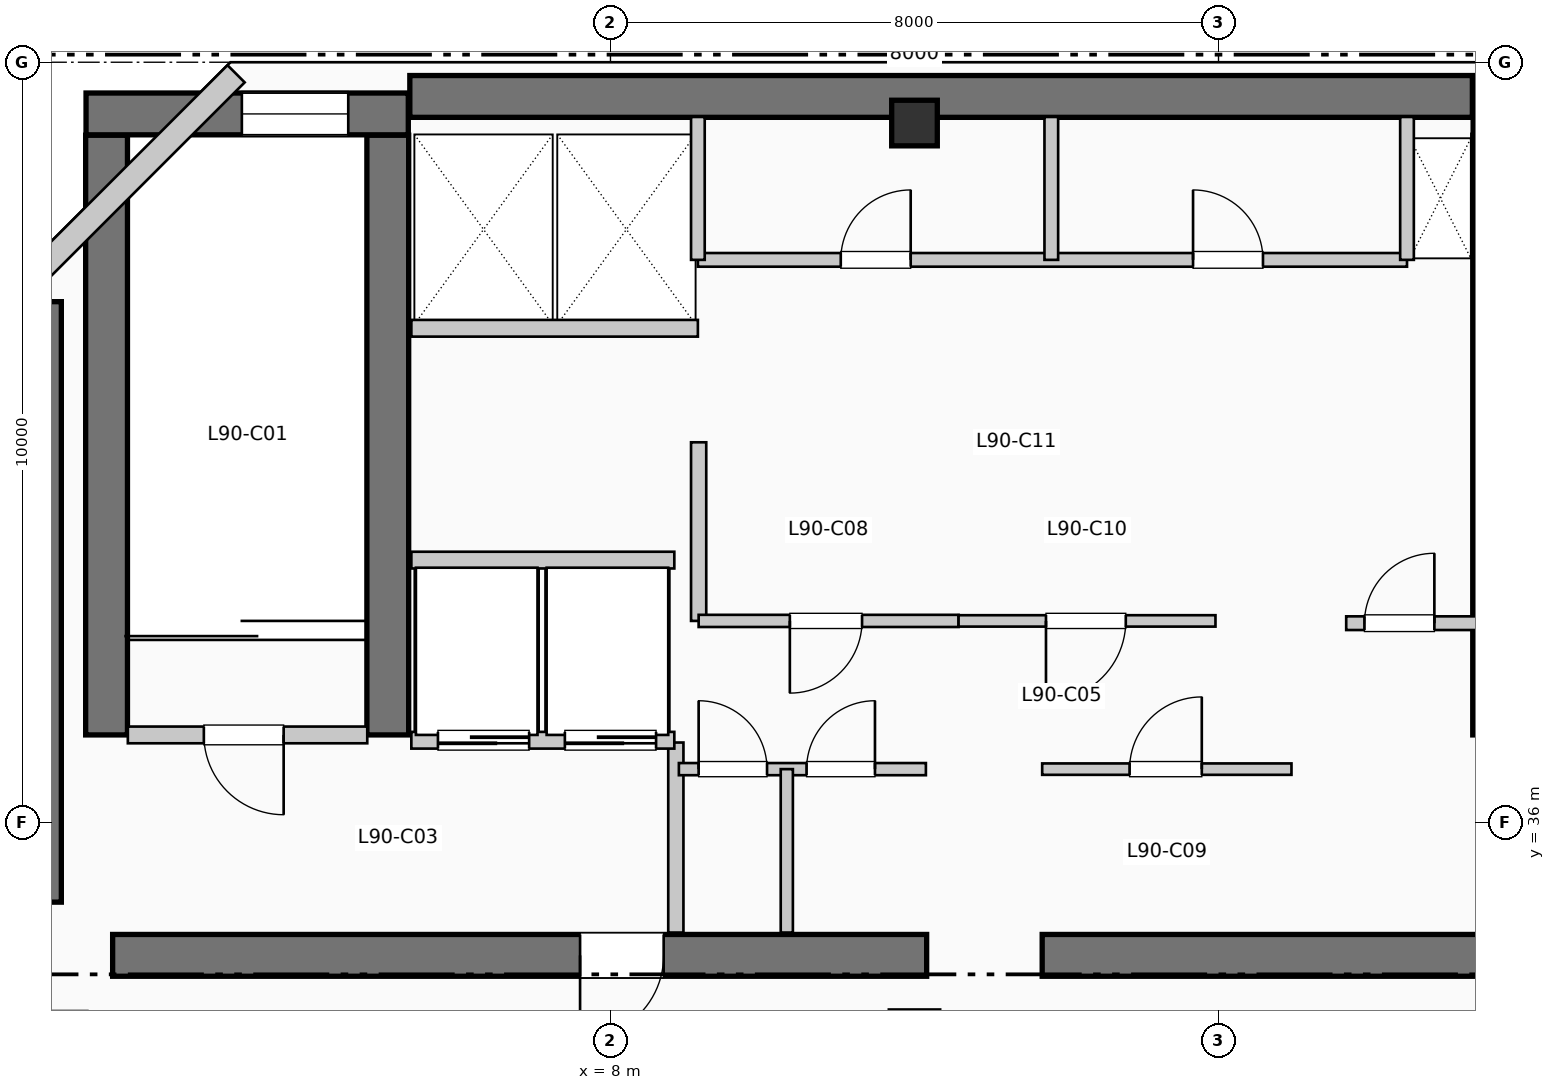
"""IFC4 building model, lengths in metres.
Left out: names, types, materials, properties, quantities, classifications, styles, units other than length and angle.
Written with IfcOpenShell. Run it as: python <this file> out.ifc"""

import sys

from ifc_helpers import new_model, si_unit, direction, frame, frame_2d, origin, origin_2d, place, context, subcontext, project, spatial, rectangle, extrude, element, fill, save


model = new_model("IFC4")
c1 = context("Model", 3, precision=1e-05, world=origin(), true_north=direction((0.0, 1.0)))
c2 = subcontext(c1, "Body", "Model", "MODEL_VIEW")
j1 = project(units=[si_unit("LENGTHUNIT", "METRE"), si_unit("PLANEANGLEUNIT", "RADIAN")], contexts=[c1])
p1 = place(None, origin())
s1 = spatial("IfcSite", under=j1, at=p1, CompositionType="ELEMENT")
p2 = place(p1, origin())
s2 = spatial("IfcBuilding", under=s1, at=p2, CompositionType="ELEMENT")
p3 = place(p2, frame((0.0, 0.0, 369.93)))
s3 = spatial("IfcBuildingStorey", under=s2, at=p3, CompositionType="ELEMENT", Elevation=369.93)
p4 = place(p3, frame((5.36, 45.55, 0.0), z_axis=(0.0, 0.0, 1.0), x_axis=(1.0, 0.0, 0.0)))
e1 = element("IfcWall", 1, at=p4, inside=s3, PredefinedType="SHEAR", context=c2, shape_type="SweptSolid", body=[
    extrude(rectangle(XDim=13.98, YDim=0.55, at=frame_2d((6.99, 0.0))), origin(), (0.0, 0.0, 1.0), 3.96),
])
p5 = place(p3, frame((0.5, 34.95, 0.0), z_axis=(0.0, 0.0, 1.0), x_axis=(0.0, 1.0, 0.0)))
e2 = element("IfcWall", 2, at=p5, inside=s3, PredefinedType="SHEAR", context=c2, shape_type="SweptSolid", body=[
    extrude(rectangle(XDim=7.9, YDim=0.55, at=frame_2d((3.95, 0.0))), origin(), (0.0, 0.0, 1.0), 3.96),
])
p6 = place(p3, frame((1.45, 34.25, 0.0), z_axis=(0.0, 0.0, 1.0), x_axis=(1.0, 0.0, 0.0)))
e3 = element("IfcWall", 3, at=p6, inside=s3, PredefinedType="SHEAR", context=c2, shape_type="SweptSolid", body=[
    extrude(rectangle(XDim=10.71, YDim=0.55, at=frame_2d((5.355, 0.0))), origin(), (0.0, 0.0, 1.0), 3.96),
])
p7 = place(p6, frame((7.25, 0.0, 0.0), z_axis=(0.0, 0.0, 1.0), x_axis=(-1.0, 0.0, 0.0)))
e4 = element("IfcOpeningElement", 4, at=p7, cuts=e3, PredefinedType="OPENING", context=c2, shape_type="SweptSolid", body=[
    extrude(rectangle(XDim=1.1, YDim=2.15, at=frame_2d((0.55, 1.075))), frame((0.0, 0.285, 0.0), z_axis=(0.0, -1.0, 0.0), x_axis=(1.0, 0.0, 0.0)), (0.0, 0.0, 1.0), 0.57),
])
p8 = place(p3, frame((13.68, 34.25, 0.0), z_axis=(0.0, 0.0, 1.0), x_axis=(1.0, 0.0, 0.0)))
e5 = element("IfcWall", 5, at=p8, inside=s3, PredefinedType="SHEAR", context=c2, shape_type="SweptSolid", body=[
    extrude(rectangle(XDim=6.12, YDim=0.55, at=frame_2d((3.06, 0.0))), origin(), (0.0, 0.0, 1.0), 3.96),
])
for number, where, z_axis, x_axis in (
    (6, (1.37, 37.15, 0.0), (0.0, 0.0, 1.0), (0.0, 1.0, 0.0)),
    (7, (5.07, 37.15, 0.0), (0.0, 0.0, 1.0), (0.0, 1.0, 0.0)),
):
    element("IfcWall", number, at=place(p3, frame(where, z_axis=z_axis, x_axis=x_axis)), inside=s3, PredefinedType="SHEAR", context=c2, shape_type="SweptSolid", body=[
        extrude(rectangle(XDim=7.89, YDim=0.55, at=frame_2d((3.945, 0.0))), origin(), (0.0, 0.0, 1.0), 3.96),
    ])
p9 = place(p3, frame((1.1, 45.32, 0.0), z_axis=(0.0, 0.0, 1.0), x_axis=(1.0, 0.0, 0.0)))
e8 = element("IfcWall", 8, at=p9, inside=s3, PredefinedType="SHEAR", context=c2, shape_type="SweptSolid", body=[
    extrude(rectangle(XDim=4.24, YDim=0.55, at=frame_2d((2.12, 0.0))), origin(), (0.0, 0.0, 1.0), 3.96),
])
p10 = place(p9, frame((2.05, 0.0, 1.05)))
e9 = element("IfcOpeningElement", 9, at=p10, cuts=e8, PredefinedType="OPENING", context=c2, shape_type="SweptSolid", body=[
    extrude(rectangle(XDim=1.4, YDim=1.8, at=frame_2d((0.7, 0.9))), frame((0.0, 0.285, 0.0), z_axis=(0.0, -1.0, 0.0), x_axis=(1.0, 0.0, 0.0)), (0.0, 0.0, 1.0), 0.57),
])
p11 = place(p3, frame((19.62, 37.15, 0.0), z_axis=(0.0, 0.0, 1.0), x_axis=(0.0, 1.0, 0.0)))
e10 = element("IfcWall", 10, at=p11, inside=s3, PredefinedType="SHEAR", context=c2, shape_type="SweptSolid", body=[
    extrude(rectangle(XDim=7.89, YDim=0.55, at=frame_2d((3.945, 0.0))), origin(), (0.0, 0.0, 1.0), 3.96),
])
p12 = place(p3, frame((19.35, 45.32, 0.0), z_axis=(0.0, 0.0, 1.0), x_axis=(1.0, 0.0, 0.0)))
e11 = element("IfcWall", 11, at=p12, inside=s3, PredefinedType="SHEAR", context=c2, shape_type="SweptSolid", body=[
    extrude(rectangle(XDim=3.69, YDim=0.55, at=frame_2d((1.845, 0.0))), origin(), (0.0, 0.0, 1.0), 3.96),
])
p13 = place(p12, frame((1.15, 0.0, 1.05)))
e12 = element("IfcOpeningElement", 12, at=p13, cuts=e11, PredefinedType="OPENING", context=c2, shape_type="SweptSolid", body=[
    extrude(rectangle(XDim=1.4, YDim=1.8, at=frame_2d((0.7, 0.9))), frame((0.0, 0.285, 0.0), z_axis=(0.0, -1.0, 0.0), x_axis=(1.0, 0.0, 0.0)), (0.0, 0.0, 1.0), 0.57),
])
p14 = place(p3, frame((12.0, 45.2, 0.0), z_axis=(0.0, 0.0, 1.0), x_axis=(1.0, 0.0, 0.0)))
e13 = element("IfcColumn", 13, at=p14, inside=s3, PredefinedType="COLUMN", context=c2, shape_type="SweptSolid", body=[
    extrude(rectangle(XDim=0.6, YDim=0.6, at=origin_2d()), origin(), (0.0, 0.0, 1.0), 3.96),
])
p15 = place(p3, frame((3.074, 45.848, 0.0), z_axis=(0.0, 0.0, 1.0), x_axis=(-0.707106781187, -0.707106781187, 0.0)))
e14 = element("IfcWall", 14, at=p15, inside=s3, PredefinedType="SOLIDWALL", context=c2, shape_type="SweptSolid", body=[
    extrude(rectangle(XDim=4.133, YDim=0.32, at=frame_2d((2.066, 0.0))), origin(), (0.0, 0.0, 1.0), 3.96),
])
p16 = place(p3, frame((1.65, 37.15, 0.0), z_axis=(0.0, 0.0, 1.0), x_axis=(1.0, 0.0, 0.0)))
e15 = element("IfcWall", 15, at=p16, inside=s3, PredefinedType="PARTITIONING", context=c2, shape_type="SweptSolid", body=[
    extrude(rectangle(XDim=3.15, YDim=0.22, at=frame_2d((1.575, 0.0))), origin(), (0.0, 0.0, 1.0), 3.96),
])
p17 = place(p16, frame((2.05, 0.0, 0.0), z_axis=(0.0, 0.0, 1.0), x_axis=(-1.0, 0.0, 0.0)))
e16 = element("IfcOpeningElement", 16, at=p17, cuts=e15, PredefinedType="OPENING", context=c2, shape_type="SweptSolid", body=[
    extrude(rectangle(XDim=1.05, YDim=2.15, at=frame_2d((0.525, 1.075))), frame((0.0, 0.12, 0.0), z_axis=(0.0, -1.0, 0.0), x_axis=(1.0, 0.0, 0.0)), (0.0, 0.0, 1.0), 0.24),
])
p18 = place(p3, frame((8.86, 34.55, 0.0), z_axis=(0.0, 0.0, 1.0), x_axis=(0.0, 1.0, 0.0)))
e17 = element("IfcWall", 17, at=p18, inside=s3, PredefinedType="PARTITIONING", context=c2, shape_type="SweptSolid", body=[
    extrude(rectangle(XDim=2.5, YDim=0.2, at=frame_2d((1.25, 0.0))), origin(), (0.0, 0.0, 1.0), 3.96),
])
p19 = place(p3, frame((5.38, 37.08, 0.0), z_axis=(0.0, 0.0, 1.0), x_axis=(1.0, 0.0, 0.0)))
e18 = element("IfcWall", 18, at=p19, inside=s3, PredefinedType="PARTITIONING", context=c2, shape_type="SweptSolid", body=[
    extrude(rectangle(XDim=3.46, YDim=0.22, at=frame_2d((1.73, 0.0))), origin(), (0.0, 0.0, 1.0), 3.96),
])
p20 = place(p19, frame((1.55, 0.0, 0.0), z_axis=(0.0, 0.0, 1.0), x_axis=(-1.0, 0.0, 0.0)))
e19 = element("IfcOpeningElement", 19, at=p20, cuts=e18, PredefinedType="OPENING", context=c2, shape_type="SweptSolid", body=[
    extrude(rectangle(XDim=1.2, YDim=2.2, at=frame_2d((0.6, 1.1))), frame((0.0, 0.12, 0.0), z_axis=(0.0, -1.0, 0.0), x_axis=(1.0, 0.0, 0.0)), (0.0, 0.0, 1.0), 0.24),
])
p21 = place(p19, frame((3.22, 0.0, 0.0), z_axis=(0.0, 0.0, 1.0), x_axis=(-1.0, 0.0, 0.0)))
e20 = element("IfcOpeningElement", 20, at=p21, cuts=e18, PredefinedType="OPENING", context=c2, shape_type="SweptSolid", body=[
    extrude(rectangle(XDim=1.2, YDim=2.2, at=frame_2d((0.6, 1.1))), frame((0.0, 0.12, 0.0), z_axis=(0.0, -1.0, 0.0), x_axis=(1.0, 0.0, 0.0)), (0.0, 0.0, 1.0), 0.24),
])
p22 = place(p3, frame((5.38, 39.45, 0.0), z_axis=(0.0, 0.0, 1.0), x_axis=(1.0, 0.0, 0.0)))
e21 = element("IfcWall", 21, at=p22, inside=s3, PredefinedType="PARTITIONING", context=c2, shape_type="SweptSolid", body=[
    extrude(rectangle(XDim=3.46, YDim=0.22, at=frame_2d((1.73, 0.0))), origin(), (0.0, 0.0, 1.0), 3.96),
])
p23 = place(p3, frame((5.38, 42.5, 0.0), z_axis=(0.0, 0.0, 1.0), x_axis=(1.0, 0.0, 0.0)))
e22 = element("IfcWall", 22, at=p23, inside=s3, PredefinedType="PARTITIONING", context=c2, shape_type="SweptSolid", body=[
    extrude(rectangle(XDim=3.77, YDim=0.22, at=frame_2d((1.885, 0.0))), origin(), (0.0, 0.0, 1.0), 3.96),
])
p24 = place(p3, frame((9.16, 38.65, 0.0), z_axis=(0.0, 0.0, 1.0), x_axis=(0.0, 1.0, 0.0)))
e23 = element("IfcWall", 23, at=p24, inside=s3, PredefinedType="PARTITIONING", context=c2, shape_type="SweptSolid", body=[
    extrude(rectangle(XDim=2.35, YDim=0.2, at=frame_2d((1.175, 0.0))), origin(), (0.0, 0.0, 1.0), 3.96),
])
p25 = place(p3, frame((17.68, 38.62, 0.0), z_axis=(0.0, 0.0, 1.0), x_axis=(1.0, 0.0, 0.0)))
e24 = element("IfcWall", 24, at=p25, inside=s3, PredefinedType="PARTITIONING", context=c2, shape_type="SweptSolid", body=[
    extrude(rectangle(XDim=1.84, YDim=0.18, at=frame_2d((0.92, 0.0))), origin(), (0.0, 0.0, 1.0), 3.96),
])
p26 = place(p25, frame((0.24, 0.0, 0.0)))
e25 = element("IfcOpeningElement", 25, at=p26, cuts=e24, PredefinedType="OPENING", context=c2, shape_type="SweptSolid", body=[
    extrude(rectangle(XDim=0.92, YDim=2.1, at=frame_2d((0.46, 1.05))), frame((0.0, 0.1, 0.0), z_axis=(0.0, -1.0, 0.0), x_axis=(1.0, 0.0, 0.0)), (0.0, 0.0, 1.0), 0.2),
])
p27 = place(p3, frame((8.9, 36.7, 0.0), z_axis=(0.0, 0.0, 1.0), x_axis=(1.0, 0.0, 0.0)))
e26 = element("IfcWall", 26, at=p27, inside=s3, PredefinedType="PARTITIONING", context=c2, shape_type="SweptSolid", body=[
    extrude(rectangle(XDim=3.25, YDim=0.16, at=frame_2d((1.625, 0.0))), origin(), (0.0, 0.0, 1.0), 3.96),
])
p28 = place(p27, frame((0.26, 0.0, 0.0)))
e27 = element("IfcOpeningElement", 27, at=p28, cuts=e26, PredefinedType="OPENING", context=c2, shape_type="SweptSolid", body=[
    extrude(rectangle(XDim=0.9, YDim=2.15, at=frame_2d((0.45, 1.075))), frame((0.0, 0.09, 0.0), z_axis=(0.0, -1.0, 0.0), x_axis=(1.0, 0.0, 0.0)), (0.0, 0.0, 1.0), 0.18),
])
p29 = place(p27, frame((1.68, 0.0, 0.0)))
e28 = element("IfcOpeningElement", 28, at=p29, cuts=e26, PredefinedType="OPENING", context=c2, shape_type="SweptSolid", body=[
    extrude(rectangle(XDim=0.9, YDim=2.15, at=frame_2d((0.45, 1.075))), frame((0.0, 0.09, 0.0), z_axis=(0.0, -1.0, 0.0), x_axis=(1.0, 0.0, 0.0)), (0.0, 0.0, 1.0), 0.18),
])
p30 = place(p3, frame((10.32, 34.55, 0.0), z_axis=(0.0, 0.0, 1.0), x_axis=(0.0, 1.0, 0.0)))
e29 = element("IfcWall", 29, at=p30, inside=s3, PredefinedType="PARTITIONING", context=c2, shape_type="SweptSolid", body=[
    extrude(rectangle(XDim=2.15, YDim=0.16, at=frame_2d((1.075, 0.0))), origin(), (0.0, 0.0, 1.0), 3.96),
])
p31 = place(p3, frame((9.16, 38.65, 0.0), z_axis=(0.0, 0.0, 1.0), x_axis=(1.0, 0.0, 0.0)))
e30 = element("IfcWall", 30, at=p31, inside=s3, PredefinedType="PARTITIONING", context=c2, shape_type="SweptSolid", body=[
    extrude(rectangle(XDim=3.42, YDim=0.16, at=frame_2d((1.71, 0.0))), origin(), (0.0, 0.0, 1.0), 3.96),
])
p32 = place(p31, frame((2.15, 0.0, 0.0), z_axis=(0.0, 0.0, 1.0), x_axis=(-1.0, 0.0, 0.0)))
e31 = element("IfcOpeningElement", 31, at=p32, cuts=e30, PredefinedType="OPENING", context=c2, shape_type="SweptSolid", body=[
    extrude(rectangle(XDim=0.95, YDim=2.15, at=frame_2d((0.475, 1.075))), frame((0.0, 0.09, 0.0), z_axis=(0.0, -1.0, 0.0), x_axis=(1.0, 0.0, 0.0)), (0.0, 0.0, 1.0), 0.18),
])
p33 = place(p3, frame((13.68, 36.7, 0.0), z_axis=(0.0, 0.0, 1.0), x_axis=(1.0, 0.0, 0.0)))
e32 = element("IfcWall", 32, at=p33, inside=s3, PredefinedType="PARTITIONING", context=c2, shape_type="SweptSolid", body=[
    extrude(rectangle(XDim=3.28, YDim=0.15, at=frame_2d((1.64, 0.0))), origin(), (0.0, 0.0, 1.0), 3.96),
])
p34 = place(p33, frame((1.15, 0.0, 0.0)))
e33 = element("IfcOpeningElement", 33, at=p34, cuts=e32, PredefinedType="OPENING", context=c2, shape_type="SweptSolid", body=[
    extrude(rectangle(XDim=0.95, YDim=2.15, at=frame_2d((0.475, 1.075))), frame((0.0, 0.085, 0.0), z_axis=(0.0, -1.0, 0.0), x_axis=(1.0, 0.0, 0.0)), (0.0, 0.0, 1.0), 0.17),
])
p35 = place(p3, frame((12.58, 38.65, 0.0), z_axis=(0.0, 0.0, 1.0), x_axis=(1.0, 0.0, 0.0)))
e34 = element("IfcWall", 34, at=p35, inside=s3, PredefinedType="PARTITIONING", context=c2, shape_type="SweptSolid", body=[
    extrude(rectangle(XDim=3.38, YDim=0.15, at=frame_2d((1.69, 0.0))), origin(), (0.0, 0.0, 1.0), 3.96),
])
p36 = place(p35, frame((2.2, 0.0, 0.0), z_axis=(0.0, 0.0, 1.0), x_axis=(-1.0, 0.0, 0.0)))
e35 = element("IfcOpeningElement", 35, at=p36, cuts=e34, PredefinedType="OPENING", context=c2, shape_type="SweptSolid", body=[
    extrude(rectangle(XDim=1.05, YDim=2.15, at=frame_2d((0.525, 1.075))), frame((0.0, 0.085, 0.0), z_axis=(0.0, -1.0, 0.0), x_axis=(1.0, 0.0, 0.0)), (0.0, 0.0, 1.0), 0.17),
])
p37 = place(p3, frame((9.15, 43.4, 0.0), z_axis=(0.0, 0.0, 1.0), x_axis=(1.0, 0.0, 0.0)))
e36 = element("IfcWall", 36, at=p37, inside=s3, PredefinedType="PLUMBINGWALL", context=c2, shape_type="SweptSolid", body=[
    extrude(rectangle(XDim=9.33, YDim=0.18, at=frame_2d((4.665, 0.0))), origin(), (0.0, 0.0, 1.0), 3.96),
])
p38 = place(p37, frame((1.88, 0.0, 0.0)))
e37 = element("IfcOpeningElement", 37, at=p38, cuts=e36, PredefinedType="OPENING", context=c2, shape_type="SweptSolid", body=[
    extrude(rectangle(XDim=0.92, YDim=2.1, at=frame_2d((0.46, 1.05))), frame((0.0, 0.1, 0.0), z_axis=(0.0, -1.0, 0.0), x_axis=(1.0, 0.0, 0.0)), (0.0, 0.0, 1.0), 0.2),
])
p39 = place(p37, frame((6.515, 0.0, 0.0)))
e38 = element("IfcOpeningElement", 38, at=p39, cuts=e36, PredefinedType="OPENING", context=c2, shape_type="SweptSolid", body=[
    extrude(rectangle(XDim=0.92, YDim=2.1, at=frame_2d((0.46, 1.05))), frame((0.0, 0.1, 0.0), z_axis=(0.0, -1.0, 0.0), x_axis=(1.0, 0.0, 0.0)), (0.0, 0.0, 1.0), 0.2),
])
for number, where, z_axis, x_axis in (
    (39, (9.15, 43.4, 0.0), (0.0, 0.0, 1.0), (0.0, 1.0, 0.0)),
    (40, (18.48, 43.4, 0.0), (0.0, 0.0, 1.0), (0.0, 1.0, 0.0)),
    (41, (13.8, 43.4, 0.0), (0.0, 0.0, 1.0), (0.0, 1.0, 0.0)),
):
    element("IfcWall", number, at=place(p3, frame(where, z_axis=z_axis, x_axis=x_axis)), inside=s3, PredefinedType="PLUMBINGWALL", context=c2, shape_type="SweptSolid", body=[
        extrude(rectangle(XDim=1.88, YDim=0.18, at=frame_2d((0.94, 0.0))), origin(), (0.0, 0.0, 1.0), 3.96),
    ])
p40 = place(p10, origin())
e42 = element("IfcWindow", 42, at=p40, inside=s3, PartitioningType="SINGLE_PANEL", PredefinedType="WINDOW", context=c2, shape_type="SweptSolid", body=[
    extrude(rectangle(XDim=1.4, YDim=1.8, at=frame_2d((0.7, 0.9))), frame((0.0, 0.03, 0.0), z_axis=(0.0, -1.0, 0.0), x_axis=(1.0, 0.0, 0.0)), (0.0, 0.0, 1.0), 0.06),
])
fill(e9, e42)
p41 = place(p17, origin())
e43 = element("IfcDoor", 43, at=p41, inside=s3, OperationType="SINGLE_SWING_RIGHT", PredefinedType="DOOR", context=c2, shape_type="SweptSolid", body=[
    extrude(rectangle(XDim=1.05, YDim=2.15, at=frame_2d((0.525, 1.075))), frame((0.0, 0.025, 0.0), z_axis=(0.0, -1.0, 0.0), x_axis=(1.0, 0.0, 0.0)), (0.0, 0.0, 1.0), 0.05),
])
fill(e16, e43)
p42 = place(p7, origin())
e44 = element("IfcDoor", 44, at=p42, inside=s3, OperationType="SINGLE_SWING_LEFT", PredefinedType="DOOR", context=c2, shape_type="SweptSolid", body=[
    extrude(rectangle(XDim=1.1, YDim=2.15, at=frame_2d((0.55, 1.075))), frame((0.0, 0.025, 0.0), z_axis=(0.0, -1.0, 0.0), x_axis=(1.0, 0.0, 0.0)), (0.0, 0.0, 1.0), 0.05),
])
fill(e4, e44)
p43 = place(p20, origin())
e45 = element("IfcDoor", 45, at=p43, inside=s3, OperationType="SLIDING_TO_RIGHT", PredefinedType="DOOR", context=c2, shape_type="SweptSolid", body=[
    extrude(rectangle(XDim=1.2, YDim=2.2, at=frame_2d((0.6, 1.1))), frame((0.0, 0.025, 0.0), z_axis=(0.0, -1.0, 0.0), x_axis=(1.0, 0.0, 0.0)), (0.0, 0.0, 1.0), 0.05),
])
fill(e19, e45)
p44 = place(p21, origin())
e46 = element("IfcDoor", 46, at=p44, inside=s3, OperationType="SLIDING_TO_RIGHT", PredefinedType="DOOR", context=c2, shape_type="SweptSolid", body=[
    extrude(rectangle(XDim=1.2, YDim=2.2, at=frame_2d((0.6, 1.1))), frame((0.0, 0.025, 0.0), z_axis=(0.0, -1.0, 0.0), x_axis=(1.0, 0.0, 0.0)), (0.0, 0.0, 1.0), 0.05),
])
fill(e20, e46)
p45 = place(p26, origin())
e47 = element("IfcDoor", 47, at=p45, inside=s3, OperationType="SINGLE_SWING_RIGHT", PredefinedType="DOOR", context=c2, shape_type="SweptSolid", body=[
    extrude(rectangle(XDim=0.92, YDim=2.1, at=frame_2d((0.46, 1.05))), frame((0.0, 0.025, 0.0), z_axis=(0.0, -1.0, 0.0), x_axis=(1.0, 0.0, 0.0)), (0.0, 0.0, 1.0), 0.05),
])
fill(e25, e47)
p46 = place(p28, origin())
e48 = element("IfcDoor", 48, at=p46, inside=s3, OperationType="SINGLE_SWING_LEFT", PredefinedType="DOOR", context=c2, shape_type="SweptSolid", body=[
    extrude(rectangle(XDim=0.9, YDim=2.15, at=frame_2d((0.45, 1.075))), frame((0.0, 0.025, 0.0), z_axis=(0.0, -1.0, 0.0), x_axis=(1.0, 0.0, 0.0)), (0.0, 0.0, 1.0), 0.05),
])
fill(e27, e48)
p47 = place(p29, origin())
e49 = element("IfcDoor", 49, at=p47, inside=s3, OperationType="SINGLE_SWING_RIGHT", PredefinedType="DOOR", context=c2, shape_type="SweptSolid", body=[
    extrude(rectangle(XDim=0.9, YDim=2.15, at=frame_2d((0.45, 1.075))), frame((0.0, 0.025, 0.0), z_axis=(0.0, -1.0, 0.0), x_axis=(1.0, 0.0, 0.0)), (0.0, 0.0, 1.0), 0.05),
])
fill(e28, e49)
p48 = place(p32, origin())
e50 = element("IfcDoor", 50, at=p48, inside=s3, OperationType="SINGLE_SWING_LEFT", PredefinedType="DOOR", context=c2, shape_type="SweptSolid", body=[
    extrude(rectangle(XDim=0.95, YDim=2.15, at=frame_2d((0.475, 1.075))), frame((0.0, 0.025, 0.0), z_axis=(0.0, -1.0, 0.0), x_axis=(1.0, 0.0, 0.0)), (0.0, 0.0, 1.0), 0.05),
])
fill(e31, e50)
p49 = place(p34, origin())
e51 = element("IfcDoor", 51, at=p49, inside=s3, OperationType="SINGLE_SWING_RIGHT", PredefinedType="DOOR", context=c2, shape_type="SweptSolid", body=[
    extrude(rectangle(XDim=0.95, YDim=2.15, at=frame_2d((0.475, 1.075))), frame((0.0, 0.025, 0.0), z_axis=(0.0, -1.0, 0.0), x_axis=(1.0, 0.0, 0.0)), (0.0, 0.0, 1.0), 0.05),
])
fill(e33, e51)
p50 = place(p36, origin())
e52 = element("IfcDoor", 52, at=p50, inside=s3, OperationType="SINGLE_SWING_LEFT", PredefinedType="DOOR", context=c2, shape_type="SweptSolid", body=[
    extrude(rectangle(XDim=1.05, YDim=2.15, at=frame_2d((0.525, 1.075))), frame((0.0, 0.025, 0.0), z_axis=(0.0, -1.0, 0.0), x_axis=(1.0, 0.0, 0.0)), (0.0, 0.0, 1.0), 0.05),
])
fill(e35, e52)
p51 = place(p38, origin())
e53 = element("IfcDoor", 53, at=p51, inside=s3, OperationType="SINGLE_SWING_RIGHT", PredefinedType="DOOR", context=c2, shape_type="SweptSolid", body=[
    extrude(rectangle(XDim=0.92, YDim=2.1, at=frame_2d((0.46, 1.05))), frame((0.0, 0.025, 0.0), z_axis=(0.0, -1.0, 0.0), x_axis=(1.0, 0.0, 0.0)), (0.0, 0.0, 1.0), 0.05),
])
fill(e37, e53)
p52 = place(p39, origin())
e54 = element("IfcDoor", 54, at=p52, inside=s3, OperationType="SINGLE_SWING_LEFT", PredefinedType="DOOR", context=c2, shape_type="SweptSolid", body=[
    extrude(rectangle(XDim=0.92, YDim=2.1, at=frame_2d((0.46, 1.05))), frame((0.0, 0.025, 0.0), z_axis=(0.0, -1.0, 0.0), x_axis=(1.0, 0.0, 0.0)), (0.0, 0.0, 1.0), 0.05),
])
fill(e38, e54)
save(model, sys.argv[1])
